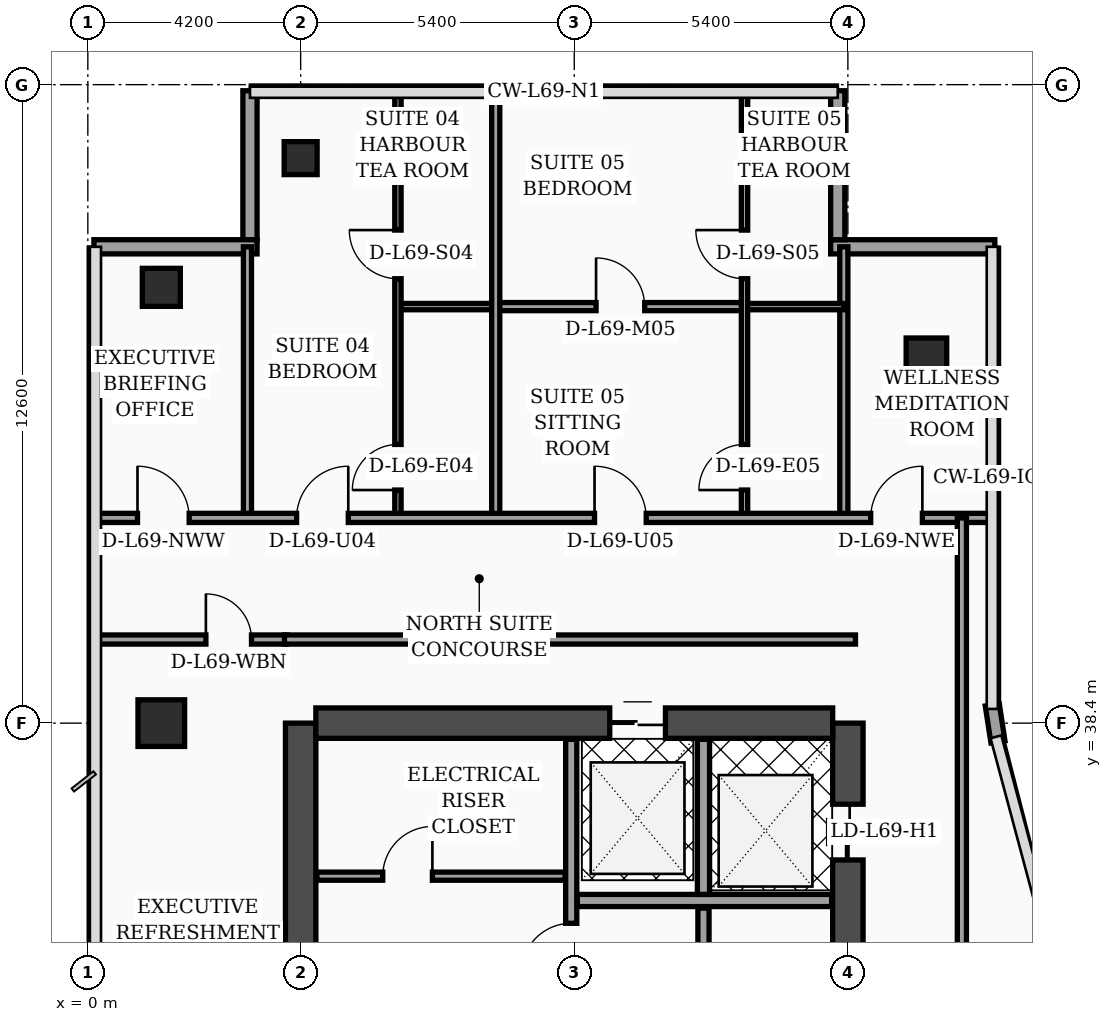
"""IFC4 building model, lengths in metres.
Left out: names, types, materials, properties, quantities, classifications, styles, units other than length and angle.
Written with IfcOpenShell. Run it as: python <this file> out.ifc"""

import sys

from ifc_helpers import new_model, si_unit, direction, frame, frame_2d, origin, origin_2d, place, context, subcontext, project, spatial, rectangle, hollow_rectangle, extrude, element, fill, save


model = new_model("IFC4")
c1 = context("Model", 3, precision=1e-05, world=origin(), true_north=direction((0.0, 1.0)))
c2 = subcontext(c1, "Body", "Model", "MODEL_VIEW")
j1 = project(units=[si_unit("LENGTHUNIT", "METRE"), si_unit("PLANEANGLEUNIT", "RADIAN")], contexts=[c1])
p1 = place(None, origin())
s1 = spatial("IfcSite", under=j1, at=p1, CompositionType="ELEMENT")
p2 = place(p1, origin())
s2 = spatial("IfcBuilding", under=s1, at=p2, CompositionType="ELEMENT")
p3 = place(p2, frame((0.0, 0.0, 278.7)))
s3 = spatial("IfcBuildingStorey", under=s2, at=p3, CompositionType="ELEMENT", Elevation=278.7)
p4 = place(p3, frame((4.2, 16.8, 0.0), z_axis=(0.0, 0.0, 1.0), x_axis=(0.0, 1.0, 0.0)))
e1 = element("IfcWall", 1, at=p4, inside=s3, PredefinedType="SHEAR", context=c2, shape_type="SweptSolid", body=[
    extrude(rectangle(XDim=21.6, YDim=0.6, at=frame_2d((10.8, 0.0))), origin(), (0.0, 0.0, 1.0), 3.52),
])
p5 = place(p3, frame((15.0, 16.8, 0.0), z_axis=(0.0, 0.0, 1.0), x_axis=(0.0, 1.0, 0.0)))
e2 = element("IfcWall", 2, at=p5, inside=s3, PredefinedType="SHEAR", context=c2, shape_type="SweptSolid", body=[
    extrude(rectangle(XDim=21.6, YDim=0.6, at=frame_2d((10.8, 0.0))), origin(), (0.0, 0.0, 1.0), 3.52),
])
p6 = place(p5, frame((8.65, 0.0, 0.0)))
e3 = element("IfcOpeningElement", 3, at=p6, cuts=e2, PredefinedType="OPENING", context=c2, shape_type="SweptSolid", body=[
    extrude(rectangle(XDim=1.1, YDim=2.2, at=frame_2d((0.55, 1.1))), frame((0.0, 0.31, 0.0), z_axis=(0.0, -1.0, 0.0), x_axis=(1.0, 0.0, 0.0)), (0.0, 0.0, 1.0), 0.62),
])
p7 = place(p5, frame((18.9, 0.0, 0.0)))
e4 = element("IfcOpeningElement", 4, at=p7, cuts=e2, PredefinedType="OPENING", context=c2, shape_type="SweptSolid", body=[
    extrude(rectangle(XDim=1.1, YDim=2.2, at=frame_2d((0.55, 1.1))), frame((0.0, 0.31, 0.0), z_axis=(0.0, -1.0, 0.0), x_axis=(1.0, 0.0, 0.0)), (0.0, 0.0, 1.0), 0.62),
])
p8 = place(p3, frame((4.5, 38.4, 0.0), z_axis=(0.0, 0.0, 1.0), x_axis=(1.0, 0.0, 0.0)))
e5 = element("IfcWall", 5, at=p8, inside=s3, PredefinedType="SHEAR", context=c2, shape_type="SweptSolid", body=[
    extrude(rectangle(XDim=10.2, YDim=0.6, at=frame_2d((5.1, 0.0))), origin(), (0.0, 0.0, 1.0), 3.52),
])
p9 = place(p8, frame((5.8, 0.0, 0.0)))
e6 = element("IfcOpeningElement", 6, at=p9, cuts=e5, PredefinedType="OPENING", context=c2, shape_type="SweptSolid", body=[
    extrude(rectangle(XDim=1.1, YDim=2.2, at=frame_2d((0.55, 1.1))), frame((0.0, 0.31, 0.0), z_axis=(0.0, -1.0, 0.0), x_axis=(1.0, 0.0, 0.0)), (0.0, 0.0, 1.0), 0.62),
])
p10 = place(p3, frame((1.45, 38.4, 0.0), z_axis=(0.0, 0.0, 1.0), x_axis=(1.0, 0.0, 0.0)))
e7 = element("IfcColumn", 7, at=p10, inside=s3, PredefinedType="COLUMN", context=c2, shape_type="SweptSolid", body=[
    extrude(rectangle(XDim=0.92, YDim=0.92, at=origin_2d()), origin(), (0.0, 0.0, 1.0), 3.52),
])
p11 = place(p3, frame((1.45, 47.0, 0.0), z_axis=(0.0, 0.0, 1.0), x_axis=(1.0, 0.0, 0.0)))
e8 = element("IfcColumn", 8, at=p11, inside=s3, PredefinedType="COLUMN", context=c2, shape_type="SweptSolid", body=[
    extrude(hollow_rectangle(XDim=0.75, YDim=0.75, WallThickness=0.032, at=origin_2d()), origin(), (0.0, 0.0, 1.0), 3.52),
])
p12 = place(p3, frame((4.2, 49.55, 0.0), z_axis=(0.0, 0.0, 1.0), x_axis=(1.0, 0.0, 0.0)))
e9 = element("IfcColumn", 9, at=p12, inside=s3, PredefinedType="COLUMN", context=c2, shape_type="SweptSolid", body=[
    extrude(hollow_rectangle(XDim=0.65, YDim=0.65, WallThickness=0.028, at=origin_2d()), origin(), (0.0, 0.0, 1.0), 3.52),
])
p13 = place(p3, frame((16.55, 45.6, 0.0), z_axis=(0.0, 0.0, 1.0), x_axis=(1.0, 0.0, 0.0)))
e10 = element("IfcColumn", 10, at=p13, inside=s3, PredefinedType="COLUMN", context=c2, shape_type="SweptSolid", body=[
    extrude(rectangle(XDim=0.8, YDim=0.8, at=origin_2d()), origin(), (0.0, 0.0, 1.0), 3.52),
])
p14 = place(p3, frame((17.962, 38.03, 0.0), z_axis=(0.0, 0.0, 1.0), x_axis=(-0.15141125477, 0.988470855377, 0.0)))
e11 = element("IfcWall", 11, at=p14, inside=s3, PredefinedType="SOLIDWALL", context=c2, shape_type="SweptSolid", body=[
    extrude(rectangle(XDim=0.739, YDim=0.28, at=frame_2d((0.369, 0.0))), origin(), (0.0, 0.0, 1.0), 3.52),
])
p15 = place(p3, frame((17.9, 47.8, 0.0), z_axis=(0.0, 0.0, 1.0), x_axis=(-1.0, 0.0, 0.0)))
e12 = element("IfcWall", 12, at=p15, inside=s3, PredefinedType="SOLIDWALL", context=c2, shape_type="SweptSolid", body=[
    extrude(rectangle(XDim=3.24, YDim=0.28, at=frame_2d((1.62, 0.0))), origin(), (0.0, 0.0, 1.0), 3.52),
])
p16 = place(p3, frame((14.8, 47.94, 0.0), z_axis=(0.0, 0.0, 1.0), x_axis=(0.0, 1.0, 0.0)))
e13 = element("IfcWall", 13, at=p16, inside=s3, PredefinedType="SOLIDWALL", context=c2, shape_type="SweptSolid", body=[
    extrude(rectangle(XDim=2.94, YDim=0.28, at=frame_2d((1.47, 0.0))), origin(), (0.0, 0.0, 1.0), 3.52),
])
p17 = place(p3, frame((3.2, 50.88, 0.0), z_axis=(0.0, 0.0, 1.0), x_axis=(0.0, -1.0, 0.0)))
e14 = element("IfcWall", 14, at=p17, inside=s3, PredefinedType="SOLIDWALL", context=c2, shape_type="SweptSolid", body=[
    extrude(rectangle(XDim=2.94, YDim=0.28, at=frame_2d((1.47, 0.0))), origin(), (0.0, 0.0, 1.0), 3.07),
])
p18 = place(p3, frame((3.34, 47.8, 0.0), z_axis=(0.0, 0.0, 1.0), x_axis=(-1.0, 0.0, 0.0)))
e15 = element("IfcWall", 15, at=p18, inside=s3, PredefinedType="SOLIDWALL", context=c2, shape_type="SweptSolid", body=[
    extrude(rectangle(XDim=3.22, YDim=0.28, at=frame_2d((1.61, 0.0))), origin(), (0.0, 0.0, 1.0), 3.07),
])
p19 = place(p3, frame((4.52, 35.38, 0.0), z_axis=(0.0, 0.0, 1.0), x_axis=(1.0, 0.0, 0.0)))
e16 = element("IfcWall", 16, at=p19, inside=s3, PredefinedType="PARTITIONING", context=c2, shape_type="SweptSolid", body=[
    extrude(rectangle(XDim=4.9, YDim=0.16, at=frame_2d((2.45, 0.0))), origin(), (0.0, 0.0, 1.0), 3.52),
])
p20 = place(p19, frame((1.3, 0.0, 0.0)))
e17 = element("IfcOpeningElement", 17, at=p20, cuts=e16, PredefinedType="OPENING", context=c2, shape_type="SweptSolid", body=[
    extrude(rectangle(XDim=0.98, YDim=2.15, at=frame_2d((0.49, 1.075))), frame((0.0, 0.09, 0.0), z_axis=(0.0, -1.0, 0.0), x_axis=(1.0, 0.0, 0.0)), (0.0, 0.0, 1.0), 0.18),
])
p21 = place(p3, frame((9.54, 32.92, 0.0), z_axis=(0.0, 0.0, 1.0), x_axis=(0.0, 1.0, 0.0)))
e18 = element("IfcWall", 18, at=p21, inside=s3, PredefinedType="SOLIDWALL", context=c2, shape_type="SweptSolid", body=[
    extrude(rectangle(XDim=5.16, YDim=0.22, at=frame_2d((2.58, 0.0))), origin(), (0.0, 0.0, 1.0), 3.52),
])
p22 = place(p21, frame((0.55, 0.0, 0.0)))
e19 = element("IfcOpeningElement", 19, at=p22, cuts=e18, PredefinedType="OPENING", context=c2, shape_type="SweptSolid", body=[
    extrude(rectangle(XDim=0.98, YDim=2.15, at=frame_2d((0.49, 1.075))), frame((0.0, 0.12, 0.0), z_axis=(0.0, -1.0, 0.0), x_axis=(1.0, 0.0, 0.0)), (0.0, 0.0, 1.0), 0.24),
])
p23 = place(p3, frame((12.15, 27.0, 0.0), z_axis=(0.0, 0.0, 1.0), x_axis=(0.0, 1.0, 0.0)))
e20 = element("IfcWall", 20, at=p23, inside=s3, PredefinedType="SOLIDWALL", context=c2, shape_type="SweptSolid", body=[
    extrude(rectangle(XDim=7.75, YDim=0.22, at=frame_2d((3.875, 0.0))), origin(), (0.0, 0.0, 1.0), 3.52),
])
p24 = place(p23, frame((0.8, 0.0, 0.0)))
e21 = element("IfcOpeningElement", 21, at=p24, cuts=e20, PredefinedType="OPENING", context=c2, shape_type="SweptSolid", body=[
    extrude(rectangle(XDim=0.98, YDim=2.15, at=frame_2d((0.49, 1.075))), frame((0.0, 0.12, 0.0), z_axis=(0.0, -1.0, 0.0), x_axis=(1.0, 0.0, 0.0)), (0.0, 0.0, 1.0), 0.24),
])
p25 = place(p3, frame((9.66, 34.9, 0.0), z_axis=(0.0, 0.0, 1.0), x_axis=(1.0, 0.0, 0.0)))
e22 = element("IfcWall", 22, at=p25, inside=s3, PredefinedType="SOLIDWALL", context=c2, shape_type="SweptSolid", body=[
    extrude(rectangle(XDim=5.02, YDim=0.24, at=frame_2d((2.51, 0.0))), origin(), (0.0, 0.0, 1.0), 3.52),
])
p26 = place(p3, frame((12.15, 35.02, 0.0), z_axis=(0.0, 0.0, 1.0), x_axis=(0.0, 1.0, 0.0)))
e23 = element("IfcWall", 23, at=p26, inside=s3, PredefinedType="SOLIDWALL", context=c2, shape_type="SweptSolid", body=[
    extrude(rectangle(XDim=3.06, YDim=0.24, at=frame_2d((1.53, 0.0))), origin(), (0.0, 0.0, 1.0), 3.52),
])
p27 = place(p3, frame((0.08, 40.05, 0.0), z_axis=(0.0, 0.0, 1.0), x_axis=(1.0, 0.0, 0.0)))
e24 = element("IfcWall", 24, at=p27, inside=s3, PredefinedType="PARTITIONING", context=c2, shape_type="SweptSolid", body=[
    extrude(rectangle(XDim=3.85, YDim=0.18, at=frame_2d((1.925, 0.0))), origin(), (0.0, 0.0, 1.0), 2.97),
])
p28 = place(p27, frame((2.25, 0.0, 0.0)))
e25 = element("IfcOpeningElement", 25, at=p28, cuts=e24, PredefinedType="OPENING", context=c2, shape_type="SweptSolid", body=[
    extrude(rectangle(XDim=0.9, YDim=2.15, at=frame_2d((0.45, 1.075))), frame((0.0, 0.1, 0.0), z_axis=(0.0, -1.0, 0.0), x_axis=(1.0, 0.0, 0.0)), (0.0, 0.0, 1.0), 0.2),
])
p29 = place(p3, frame((3.15, 42.45, 0.0), z_axis=(0.0, 0.0, 1.0), x_axis=(0.0, 1.0, 0.0)))
e26 = element("IfcWall", 26, at=p29, inside=s3, PredefinedType="PARTITIONING", context=c2, shape_type="SweptSolid", body=[
    extrude(rectangle(XDim=5.35, YDim=0.16, at=frame_2d((2.675, 0.0))), origin(), (0.0, 0.0, 1.0), 3.12),
])
p30 = place(p3, frame((14.92, 42.45, 0.0), z_axis=(0.0, 0.0, 1.0), x_axis=(0.0, 1.0, 0.0)))
e27 = element("IfcWall", 27, at=p30, inside=s3, PredefinedType="PARTITIONING", context=c2, shape_type="SweptSolid", body=[
    extrude(rectangle(XDim=5.35, YDim=0.16, at=frame_2d((2.675, 0.0))), origin(), (0.0, 0.0, 1.0), 3.07),
])
p31 = place(p3, frame((6.12, 46.62, 0.0), z_axis=(0.0, 0.0, 1.0), x_axis=(1.0, 0.0, 0.0)))
e28 = element("IfcWall", 28, at=p31, inside=s3, PredefinedType="PARTITIONING", context=c2, shape_type="SweptSolid", body=[
    extrude(rectangle(XDim=1.93, YDim=0.125, at=frame_2d((0.965, 0.0))), origin(), (0.0, 0.0, 1.0), 3.52),
])
p32 = place(p3, frame((6.12, 42.45, 0.0), z_axis=(0.0, 0.0, 1.0), x_axis=(0.0, 1.0, 0.0)))
e29 = element("IfcWall", 29, at=p32, inside=s3, PredefinedType="PARTITIONING", context=c2, shape_type="SweptSolid", body=[
    extrude(rectangle(XDim=8.49, YDim=0.125, at=frame_2d((4.245, 0.0))), origin(), (0.0, 0.0, 1.0), 3.07),
])
p33 = place(p32, frame((0.55, 0.0, 0.0)))
e30 = element("IfcOpeningElement", 30, at=p33, cuts=e29, PredefinedType="OPENING", context=c2, shape_type="SweptSolid", body=[
    extrude(rectangle(XDim=0.9, YDim=2.15, at=frame_2d((0.45, 1.075))), frame((0.0, 0.073, 0.0), z_axis=(0.0, -1.0, 0.0), x_axis=(1.0, 0.0, 0.0)), (0.0, 0.0, 1.0), 0.145),
])
p34 = place(p32, frame((4.72, 0.0, 0.0)))
e31 = element("IfcOpeningElement", 31, at=p34, cuts=e29, PredefinedType="OPENING", context=c2, shape_type="SweptSolid", body=[
    extrude(rectangle(XDim=0.96, YDim=2.2, at=frame_2d((0.48, 1.1))), frame((0.0, 0.073, 0.0), z_axis=(0.0, -1.0, 0.0), x_axis=(1.0, 0.0, 0.0)), (0.0, 0.0, 1.0), 0.145),
])
p35 = place(p3, frame((12.96, 46.62, 0.0), z_axis=(0.0, 0.0, 1.0), x_axis=(1.0, 0.0, 0.0)))
e32 = element("IfcWall", 32, at=p35, inside=s3, PredefinedType="PARTITIONING", context=c2, shape_type="SweptSolid", body=[
    extrude(rectangle(XDim=1.96, YDim=0.125, at=frame_2d((0.98, 0.0))), origin(), (0.0, 0.0, 1.0), 3.07),
])
p36 = place(p3, frame((8.05, 46.62, 0.0), z_axis=(0.0, 0.0, 1.0), x_axis=(1.0, 0.0, 0.0)))
e33 = element("IfcWall", 33, at=p36, inside=s3, PredefinedType="PARTITIONING", context=c2, shape_type="SweptSolid", body=[
    extrude(rectangle(XDim=4.91, YDim=0.16, at=frame_2d((2.455, 0.0))), origin(), (0.0, 0.0, 1.0), 3.07),
])
p37 = place(p36, frame((1.98, 0.0, 0.0)))
e34 = element("IfcOpeningElement", 34, at=p37, cuts=e33, PredefinedType="OPENING", context=c2, shape_type="SweptSolid", body=[
    extrude(rectangle(XDim=0.96, YDim=2.2, at=frame_2d((0.48, 1.1))), frame((0.0, 0.09, 0.0), z_axis=(0.0, -1.0, 0.0), x_axis=(1.0, 0.0, 0.0)), (0.0, 0.0, 1.0), 0.18),
])
p38 = place(p3, frame((12.96, 42.45, 0.0), z_axis=(0.0, 0.0, 1.0), x_axis=(0.0, 1.0, 0.0)))
e35 = element("IfcWall", 35, at=p38, inside=s3, PredefinedType="PARTITIONING", context=c2, shape_type="SweptSolid", body=[
    extrude(rectangle(XDim=8.49, YDim=0.125, at=frame_2d((4.245, 0.0))), origin(), (0.0, 0.0, 1.0), 3.07),
])
p39 = place(p38, frame((0.55, 0.0, 0.0)))
e36 = element("IfcOpeningElement", 36, at=p39, cuts=e35, PredefinedType="OPENING", context=c2, shape_type="SweptSolid", body=[
    extrude(rectangle(XDim=0.9, YDim=2.15, at=frame_2d((0.45, 1.075))), frame((0.0, 0.073, 0.0), z_axis=(0.0, -1.0, 0.0), x_axis=(1.0, 0.0, 0.0)), (0.0, 0.0, 1.0), 0.145),
])
p40 = place(p38, frame((4.72, 0.0, 0.0)))
e37 = element("IfcOpeningElement", 37, at=p40, cuts=e35, PredefinedType="OPENING", context=c2, shape_type="SweptSolid", body=[
    extrude(rectangle(XDim=0.96, YDim=2.2, at=frame_2d((0.48, 1.1))), frame((0.0, 0.073, 0.0), z_axis=(0.0, -1.0, 0.0), x_axis=(1.0, 0.0, 0.0)), (0.0, 0.0, 1.0), 0.145),
])
p41 = place(p3, frame((8.05, 42.45, 0.0), z_axis=(0.0, 0.0, 1.0), x_axis=(0.0, 1.0, 0.0)))
e38 = element("IfcWall", 38, at=p41, inside=s3, PredefinedType="PARTITIONING", context=c2, shape_type="SweptSolid", body=[
    extrude(rectangle(XDim=8.49, YDim=0.16, at=frame_2d((4.245, 0.0))), origin(), (0.0, 0.0, 1.0), 3.07),
])
p42 = place(p3, frame((0.08, 42.45, 0.0), z_axis=(0.0, 0.0, 1.0), x_axis=(1.0, 0.0, 0.0)))
e39 = element("IfcWall", 39, at=p42, inside=s3, PredefinedType="PARTITIONING", context=c2, shape_type="SweptSolid", body=[
    extrude(rectangle(XDim=17.77, YDim=0.18, at=frame_2d((8.885, 0.0))), origin(), (0.0, 0.0, 1.0), 2.97),
])
p43 = place(p42, frame((0.9, 0.0, 0.0)))
e40 = element("IfcOpeningElement", 40, at=p43, cuts=e39, PredefinedType="OPENING", context=c2, shape_type="SweptSolid", body=[
    extrude(rectangle(XDim=1.02, YDim=2.2, at=frame_2d((0.51, 1.1))), frame((0.0, 0.1, 0.0), z_axis=(0.0, -1.0, 0.0), x_axis=(1.0, 0.0, 0.0)), (0.0, 0.0, 1.0), 0.2),
])
p44 = place(p42, frame((4.04, 0.0, 0.0)))
e41 = element("IfcOpeningElement", 41, at=p44, cuts=e39, PredefinedType="OPENING", context=c2, shape_type="SweptSolid", body=[
    extrude(rectangle(XDim=1.02, YDim=2.2, at=frame_2d((0.51, 1.1))), frame((0.0, 0.1, 0.0), z_axis=(0.0, -1.0, 0.0), x_axis=(1.0, 0.0, 0.0)), (0.0, 0.0, 1.0), 0.2),
])
p45 = place(p42, frame((9.92, 0.0, 0.0)))
e42 = element("IfcOpeningElement", 42, at=p45, cuts=e39, PredefinedType="OPENING", context=c2, shape_type="SweptSolid", body=[
    extrude(rectangle(XDim=1.02, YDim=2.2, at=frame_2d((0.51, 1.1))), frame((0.0, 0.1, 0.0), z_axis=(0.0, -1.0, 0.0), x_axis=(1.0, 0.0, 0.0)), (0.0, 0.0, 1.0), 0.2),
])
p46 = place(p42, frame((15.37, 0.0, 0.0)))
e43 = element("IfcOpeningElement", 43, at=p46, cuts=e39, PredefinedType="OPENING", context=c2, shape_type="SweptSolid", body=[
    extrude(rectangle(XDim=1.02, YDim=2.2, at=frame_2d((0.51, 1.1))), frame((0.0, 0.1, 0.0), z_axis=(0.0, -1.0, 0.0), x_axis=(1.0, 0.0, 0.0)), (0.0, 0.0, 1.0), 0.2),
])
p47 = place(p3, frame((17.25, 24.3, 0.0), z_axis=(0.0, 0.0, 1.0), x_axis=(0.0, 1.0, 0.0)))
e44 = element("IfcWall", 44, at=p47, inside=s3, PredefinedType="PARTITIONING", context=c2, shape_type="SweptSolid", body=[
    extrude(rectangle(XDim=18.15, YDim=0.18, at=frame_2d((9.075, 0.0))), origin(), (0.0, 0.0, 1.0), 2.97),
])
p48 = place(p47, frame((3.2, 0.0, 0.0)))
e45 = element("IfcOpeningElement", 45, at=p48, cuts=e44, PredefinedType="OPENING", context=c2, shape_type="SweptSolid", body=[
    extrude(rectangle(XDim=1.02, YDim=2.2, at=frame_2d((0.51, 1.1))), frame((0.0, 0.1, 0.0), z_axis=(0.0, -1.0, 0.0), x_axis=(1.0, 0.0, 0.0)), (0.0, 0.0, 1.0), 0.2),
])
p49 = place(p3, frame((3.88, 40.05, 0.0), z_axis=(0.0, 0.0, 1.0), x_axis=(1.0, 0.0, 0.0)))
e46 = element("IfcWall", 46, at=p49, inside=s3, PredefinedType="PARTITIONING", context=c2, shape_type="SweptSolid", body=[
    extrude(rectangle(XDim=11.27, YDim=0.18, at=frame_2d((5.635, 0.0))), origin(), (0.0, 0.0, 1.0), 2.97),
])
p50 = place(p20, origin())
e47 = element("IfcDoor", 47, at=p50, inside=s3, OperationType="SINGLE_SWING_RIGHT", PredefinedType="DOOR", context=c2, shape_type="SweptSolid", body=[
    extrude(rectangle(XDim=0.98, YDim=2.15, at=frame_2d((0.49, 1.075))), frame((0.0, 0.025, 0.0), z_axis=(0.0, -1.0, 0.0), x_axis=(1.0, 0.0, 0.0)), (0.0, 0.0, 1.0), 0.05),
])
fill(e17, e47)
p51 = place(p22, origin())
e48 = element("IfcDoor", 48, at=p51, inside=s3, OperationType="SINGLE_SWING_LEFT", PredefinedType="DOOR", context=c2, shape_type="SweptSolid", body=[
    extrude(rectangle(XDim=0.98, YDim=2.15, at=frame_2d((0.49, 1.075))), frame((0.0, 0.025, 0.0), z_axis=(0.0, -1.0, 0.0), x_axis=(1.0, 0.0, 0.0)), (0.0, 0.0, 1.0), 0.05),
])
fill(e19, e48)
p52 = place(p28, origin())
e49 = element("IfcDoor", 49, at=p52, inside=s3, OperationType="SINGLE_SWING_LEFT", PredefinedType="DOOR", context=c2, shape_type="SweptSolid", body=[
    extrude(rectangle(XDim=0.9, YDim=2.15, at=frame_2d((0.45, 1.075))), frame((0.0, 0.025, 0.0), z_axis=(0.0, -1.0, 0.0), x_axis=(1.0, 0.0, 0.0)), (0.0, 0.0, 1.0), 0.05),
])
fill(e25, e49)
p53 = place(p33, origin())
e50 = element("IfcDoor", 50, at=p53, inside=s3, OperationType="SINGLE_SWING_LEFT", PredefinedType="DOOR", context=c2, shape_type="SweptSolid", body=[
    extrude(rectangle(XDim=0.9, YDim=2.15, at=frame_2d((0.45, 1.075))), frame((0.0, 0.025, 0.0), z_axis=(0.0, -1.0, 0.0), x_axis=(1.0, 0.0, 0.0)), (0.0, 0.0, 1.0), 0.05),
])
fill(e30, e50)
p54 = place(p34, origin())
e51 = element("IfcDoor", 51, at=p54, inside=s3, OperationType="SINGLE_SWING_RIGHT", PredefinedType="DOOR", context=c2, shape_type="SweptSolid", body=[
    extrude(rectangle(XDim=0.96, YDim=2.2, at=frame_2d((0.48, 1.1))), frame((0.0, 0.025, 0.0), z_axis=(0.0, -1.0, 0.0), x_axis=(1.0, 0.0, 0.0)), (0.0, 0.0, 1.0), 0.05),
])
fill(e31, e51)
p55 = place(p37, origin())
e52 = element("IfcDoor", 52, at=p55, inside=s3, OperationType="SINGLE_SWING_LEFT", PredefinedType="DOOR", context=c2, shape_type="SweptSolid", body=[
    extrude(rectangle(XDim=0.96, YDim=2.2, at=frame_2d((0.48, 1.1))), frame((0.0, 0.025, 0.0), z_axis=(0.0, -1.0, 0.0), x_axis=(1.0, 0.0, 0.0)), (0.0, 0.0, 1.0), 0.05),
])
fill(e34, e52)
p56 = place(p39, origin())
e53 = element("IfcDoor", 53, at=p56, inside=s3, OperationType="SINGLE_SWING_LEFT", PredefinedType="DOOR", context=c2, shape_type="SweptSolid", body=[
    extrude(rectangle(XDim=0.9, YDim=2.15, at=frame_2d((0.45, 1.075))), frame((0.0, 0.025, 0.0), z_axis=(0.0, -1.0, 0.0), x_axis=(1.0, 0.0, 0.0)), (0.0, 0.0, 1.0), 0.05),
])
fill(e36, e53)
p57 = place(p40, origin())
e54 = element("IfcDoor", 54, at=p57, inside=s3, OperationType="SINGLE_SWING_RIGHT", PredefinedType="DOOR", context=c2, shape_type="SweptSolid", body=[
    extrude(rectangle(XDim=0.96, YDim=2.2, at=frame_2d((0.48, 1.1))), frame((0.0, 0.025, 0.0), z_axis=(0.0, -1.0, 0.0), x_axis=(1.0, 0.0, 0.0)), (0.0, 0.0, 1.0), 0.05),
])
fill(e37, e54)
p58 = place(p43, origin())
e55 = element("IfcDoor", 55, at=p58, inside=s3, OperationType="SINGLE_SWING_LEFT", PredefinedType="DOOR", context=c2, shape_type="SweptSolid", body=[
    extrude(rectangle(XDim=1.02, YDim=2.2, at=frame_2d((0.51, 1.1))), frame((0.0, 0.025, 0.0), z_axis=(0.0, -1.0, 0.0), x_axis=(1.0, 0.0, 0.0)), (0.0, 0.0, 1.0), 0.05),
])
fill(e40, e55)
p59 = place(p44, origin())
e56 = element("IfcDoor", 56, at=p59, inside=s3, OperationType="SINGLE_SWING_RIGHT", PredefinedType="DOOR", context=c2, shape_type="SweptSolid", body=[
    extrude(rectangle(XDim=1.02, YDim=2.2, at=frame_2d((0.51, 1.1))), frame((0.0, 0.025, 0.0), z_axis=(0.0, -1.0, 0.0), x_axis=(1.0, 0.0, 0.0)), (0.0, 0.0, 1.0), 0.05),
])
fill(e41, e56)
p60 = place(p45, origin())
e57 = element("IfcDoor", 57, at=p60, inside=s3, OperationType="SINGLE_SWING_LEFT", PredefinedType="DOOR", context=c2, shape_type="SweptSolid", body=[
    extrude(rectangle(XDim=1.02, YDim=2.2, at=frame_2d((0.51, 1.1))), frame((0.0, 0.025, 0.0), z_axis=(0.0, -1.0, 0.0), x_axis=(1.0, 0.0, 0.0)), (0.0, 0.0, 1.0), 0.05),
])
fill(e42, e57)
p61 = place(p46, origin())
e58 = element("IfcDoor", 58, at=p61, inside=s3, OperationType="SINGLE_SWING_RIGHT", PredefinedType="DOOR", context=c2, shape_type="SweptSolid", body=[
    extrude(rectangle(XDim=1.02, YDim=2.2, at=frame_2d((0.51, 1.1))), frame((0.0, 0.025, 0.0), z_axis=(0.0, -1.0, 0.0), x_axis=(1.0, 0.0, 0.0)), (0.0, 0.0, 1.0), 0.05),
])
fill(e43, e58)
p62 = place(p7, origin())
e59 = element("IfcDoor", 59, at=p62, inside=s3, OperationType="DOUBLE_DOOR_SLIDING", PredefinedType="DOOR", context=c2, shape_type="SweptSolid", body=[
    extrude(rectangle(XDim=1.1, YDim=2.2, at=frame_2d((0.55, 1.1))), frame((0.0, 0.025, 0.0), z_axis=(0.0, -1.0, 0.0), x_axis=(1.0, 0.0, 0.0)), (0.0, 0.0, 1.0), 0.05),
])
fill(e4, e59)
p63 = place(p9, origin())
e60 = element("IfcDoor", 60, at=p63, inside=s3, OperationType="DOUBLE_DOOR_SLIDING", PredefinedType="DOOR", context=c2, shape_type="SweptSolid", body=[
    extrude(rectangle(XDim=1.1, YDim=2.2, at=frame_2d((0.55, 1.1))), frame((0.0, 0.025, 0.0), z_axis=(0.0, -1.0, 0.0), x_axis=(1.0, 0.0, 0.0)), (0.0, 0.0, 1.0), 0.05),
])
fill(e6, e60)
save(model, sys.argv[1])
